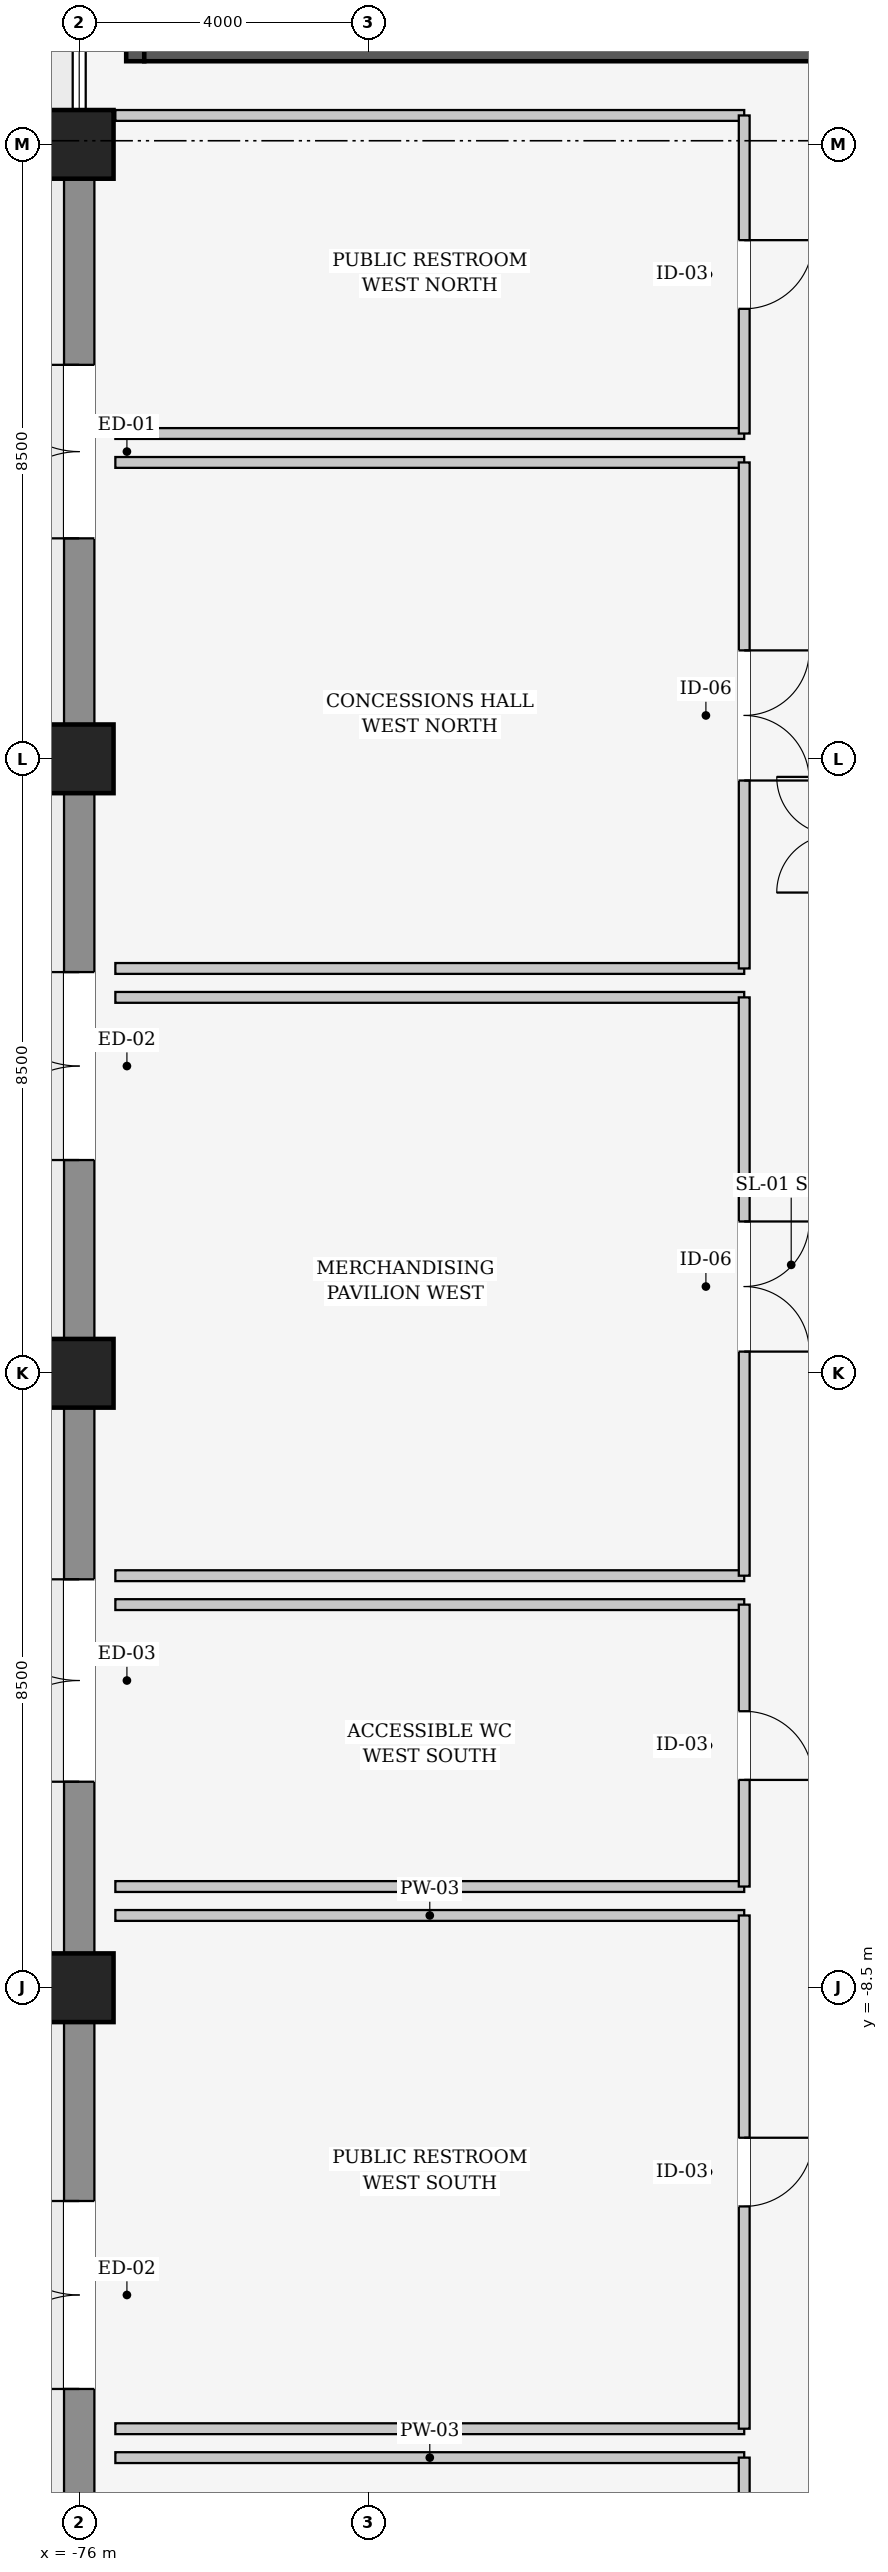
"""IFC4 building model, lengths in metres.
Left out: names, types, materials, properties, quantities, classifications, styles, units other than length and angle.
Written with IfcOpenShell. Run it as: python <this file> out.ifc"""

import sys

from ifc_helpers import new_model, si_unit, direction, frame, frame_2d, origin, origin_2d, place, context, subcontext, project, spatial, rectangle, extrude, element, fill, save


model = new_model("IFC4")
c1 = context("Model", 3, precision=1e-05, world=origin(), true_north=direction((0.0, 1.0)))
c2 = subcontext(c1, "Body", "Model", "MODEL_VIEW")
j1 = project(units=[si_unit("LENGTHUNIT", "METRE"), si_unit("PLANEANGLEUNIT", "RADIAN")], contexts=[c1])
p1 = place(None, origin())
s1 = spatial("IfcSite", under=j1, at=p1, CompositionType="ELEMENT")
p2 = place(p1, origin())
s2 = spatial("IfcBuilding", under=s1, at=p2, CompositionType="ELEMENT")
p3 = place(p2, origin())
s3 = spatial("IfcBuildingStorey", under=s2, at=p3, CompositionType="ELEMENT", Elevation=0.0)
for number, where, z_axis, x_axis in (
    (1, (-76.0, -8.5, 0.0), (0.0, 0.0, 1.0), (1.0, 0.0, 0.0)),
    (2, (-76.0, 0.0, 0.0), (0.0, 0.0, 1.0), (1.0, 0.0, 0.0)),
    (3, (-76.0, 8.5, 0.0), (0.0, 0.0, 1.0), (1.0, 0.0, 0.0)),
    (4, (-76.0, 17.0, 0.0), (0.0, 0.0, 1.0), (1.0, 0.0, 0.0)),
):
    element("IfcColumn", number, at=place(p3, frame(where, z_axis=z_axis, x_axis=x_axis)), inside=s3, PredefinedType="COLUMN", context=c2, shape_type="SweptSolid", body=[
        extrude(rectangle(XDim=0.95, YDim=0.95, at=origin_2d()), origin(), (0.0, 0.0, 1.0), 6.0),
    ])
p4 = place(p3, frame((-76.0, -16.543, 0.0), z_axis=(0.0, 0.0, 1.0), x_axis=(0.0, 1.0, 0.0)))
e5 = element("IfcWall", 5, at=p4, inside=s3, PredefinedType="SOLIDWALL", context=c2, shape_type="SweptSolid", body=[
    extrude(rectangle(XDim=7.586, YDim=0.42, at=frame_2d((3.793, 0.0))), origin(), (0.0, 0.0, 1.0), 4.74),
])
p5 = place(p4, frame((2.493, 0.0, 0.0)))
e6 = element("IfcOpeningElement", 6, at=p5, cuts=e5, PredefinedType="OPENING", context=c2, shape_type="SweptSolid", body=[
    extrude(rectangle(XDim=2.6, YDim=3.0, at=frame_2d((1.3, 1.5))), frame((0.0, 0.22, 0.0), z_axis=(0.0, -1.0, 0.0), x_axis=(1.0, 0.0, 0.0)), (0.0, 0.0, 1.0), 0.44),
])
p6 = place(p3, frame((-76.0, -8.043, 0.0), z_axis=(0.0, 0.0, 1.0), x_axis=(0.0, 1.0, 0.0)))
e7 = element("IfcWall", 7, at=p6, inside=s3, PredefinedType="SOLIDWALL", context=c2, shape_type="SweptSolid", body=[
    extrude(rectangle(XDim=7.586, YDim=0.42, at=frame_2d((3.793, 0.0))), origin(), (0.0, 0.0, 1.0), 4.74),
])
p7 = place(p6, frame((2.393, 0.0, 0.0)))
e8 = element("IfcOpeningElement", 8, at=p7, cuts=e7, PredefinedType="OPENING", context=c2, shape_type="SweptSolid", body=[
    extrude(rectangle(XDim=2.8, YDim=3.2, at=frame_2d((1.4, 1.6))), frame((0.0, 0.22, 0.0), z_axis=(0.0, -1.0, 0.0), x_axis=(1.0, 0.0, 0.0)), (0.0, 0.0, 1.0), 0.44),
])
p8 = place(p3, frame((-76.0, 0.457, 0.0), z_axis=(0.0, 0.0, 1.0), x_axis=(0.0, 1.0, 0.0)))
e9 = element("IfcWall", 9, at=p8, inside=s3, PredefinedType="SOLIDWALL", context=c2, shape_type="SweptSolid", body=[
    extrude(rectangle(XDim=7.586, YDim=0.42, at=frame_2d((3.793, 0.0))), origin(), (0.0, 0.0, 1.0), 4.74),
])
p9 = place(p8, frame((2.493, 0.0, 0.0)))
e10 = element("IfcOpeningElement", 10, at=p9, cuts=e9, PredefinedType="OPENING", context=c2, shape_type="SweptSolid", body=[
    extrude(rectangle(XDim=2.6, YDim=3.0, at=frame_2d((1.3, 1.5))), frame((0.0, 0.22, 0.0), z_axis=(0.0, -1.0, 0.0), x_axis=(1.0, 0.0, 0.0)), (0.0, 0.0, 1.0), 0.44),
])
p10 = place(p3, frame((-76.0, 8.957, 0.0), z_axis=(0.0, 0.0, 1.0), x_axis=(0.0, 1.0, 0.0)))
e11 = element("IfcWall", 11, at=p10, inside=s3, PredefinedType="SOLIDWALL", context=c2, shape_type="SweptSolid", body=[
    extrude(rectangle(XDim=7.586, YDim=0.42, at=frame_2d((3.793, 0.0))), origin(), (0.0, 0.0, 1.0), 4.74),
])
p11 = place(p10, frame((2.593, 0.0, 0.0)))
e12 = element("IfcOpeningElement", 12, at=p11, cuts=e11, PredefinedType="OPENING", context=c2, shape_type="SweptSolid", body=[
    extrude(rectangle(XDim=2.4, YDim=3.0, at=frame_2d((1.2, 1.5))), frame((0.0, 0.22, 0.0), z_axis=(0.0, -1.0, 0.0), x_axis=(1.0, 0.0, 0.0)), (0.0, 0.0, 1.0), 0.44),
])
p12 = place(p3, frame((-75.225, 18.15, 0.0), z_axis=(0.0, 0.0, 1.0), x_axis=(0.0, 1.0, 0.0)))
e13 = element("IfcWall", 13, at=p12, inside=s3, PredefinedType="SHEAR", context=c2, shape_type="SweptSolid", body=[
    extrude(rectangle(XDim=5.7, YDim=0.25, at=frame_2d((2.85, 0.0))), origin(), (0.0, 0.0, 1.0), 6.0),
])
p13 = place(p3, frame((-64.9, 18.275, 0.0), z_axis=(0.0, 0.0, 1.0), x_axis=(-1.0, 0.0, 0.0)))
e14 = element("IfcWall", 14, at=p13, inside=s3, PredefinedType="SHEAR", context=c2, shape_type="SweptSolid", body=[
    extrude(rectangle(XDim=10.2, YDim=0.25, at=frame_2d((5.1, 0.0))), origin(), (0.0, 0.0, 1.0), 6.0),
])
p14 = place(p3, frame((-75.5, -15.0, 0.0), z_axis=(0.0, 0.0, 1.0), x_axis=(1.0, 0.0, 0.0)))
e15 = element("IfcWall", 15, at=p14, inside=s3, PredefinedType="PARTITIONING", context=c2, shape_type="SweptSolid", body=[
    extrude(rectangle(XDim=8.7, YDim=0.15, at=frame_2d((4.35, 0.0))), origin(), (0.0, 0.0, 1.0), 5.64),
])
p15 = place(p3, frame((-66.8, -15.0, 0.0), z_axis=(0.0, 0.0, 1.0), x_axis=(0.0, -1.0, 0.0)))
e16 = element("IfcWall", 16, at=p15, inside=s3, PredefinedType="PARTITIONING", context=c2, shape_type="SweptSolid", body=[
    extrude(rectangle(XDim=9.4, YDim=0.15, at=frame_2d((4.7, 0.0))), origin(), (0.0, 0.0, 1.0), 4.725),
])
p16 = place(p15, frame((3.8, 0.0, 0.0)))
e17 = element("IfcOpeningElement", 17, at=p16, cuts=e16, PredefinedType="OPENING", context=c2, shape_type="SweptSolid", body=[
    extrude(rectangle(XDim=1.8, YDim=2.2, at=frame_2d((0.9, 1.1))), frame((0.0, 0.085, 0.0), z_axis=(0.0, -1.0, 0.0), x_axis=(1.0, 0.0, 0.0)), (0.0, 0.0, 1.0), 0.17),
])
for number, where, z_axis, x_axis in (
    (18, (-75.5, -7.5, 0.0), (0.0, 0.0, 1.0), (1.0, 0.0, 0.0)),
    (19, (-66.8, -14.6, 0.0), (0.0, 0.0, 1.0), (-1.0, 0.0, 0.0)),
):
    element("IfcWall", number, at=place(p3, frame(where, z_axis=z_axis, x_axis=x_axis)), inside=s3, PredefinedType="PARTITIONING", context=c2, shape_type="SweptSolid", body=[
        extrude(rectangle(XDim=8.7, YDim=0.15, at=frame_2d((4.35, 0.0))), origin(), (0.0, 0.0, 1.0), 5.64),
    ])
p17 = place(p3, frame((-66.8, -7.5, 0.0), z_axis=(0.0, 0.0, 1.0), x_axis=(0.0, -1.0, 0.0)))
e20 = element("IfcWall", 20, at=p17, inside=s3, PredefinedType="PARTITIONING", context=c2, shape_type="SweptSolid", body=[
    extrude(rectangle(XDim=7.1, YDim=0.15, at=frame_2d((3.55, 0.0))), origin(), (0.0, 0.0, 1.0), 4.725),
])
p18 = place(p17, frame((3.075, 0.0, 0.0)))
e21 = element("IfcOpeningElement", 21, at=p18, cuts=e20, PredefinedType="OPENING", context=c2, shape_type="SweptSolid", body=[
    extrude(rectangle(XDim=0.95, YDim=2.15, at=frame_2d((0.475, 1.075))), frame((0.0, 0.085, 0.0), z_axis=(0.0, -1.0, 0.0), x_axis=(1.0, 0.0, 0.0)), (0.0, 0.0, 1.0), 0.17),
])
for number, where, z_axis, x_axis in (
    (22, (-75.5, -3.2, 0.0), (0.0, 0.0, 1.0), (1.0, 0.0, 0.0)),
    (23, (-66.8, -7.1, 0.0), (0.0, 0.0, 1.0), (-1.0, 0.0, 0.0)),
):
    element("IfcWall", number, at=place(p3, frame(where, z_axis=z_axis, x_axis=x_axis)), inside=s3, PredefinedType="PARTITIONING", context=c2, shape_type="SweptSolid", body=[
        extrude(rectangle(XDim=8.7, YDim=0.15, at=frame_2d((4.35, 0.0))), origin(), (0.0, 0.0, 1.0), 5.64),
    ])
p19 = place(p3, frame((-66.8, -3.2, 0.0), z_axis=(0.0, 0.0, 1.0), x_axis=(0.0, -1.0, 0.0)))
e24 = element("IfcWall", 24, at=p19, inside=s3, PredefinedType="PARTITIONING", context=c2, shape_type="SweptSolid", body=[
    extrude(rectangle(XDim=3.9, YDim=0.15, at=frame_2d((1.95, 0.0))), origin(), (0.0, 0.0, 1.0), 5.32),
])
p20 = place(p19, frame((1.475, 0.0, 0.0)))
e25 = element("IfcOpeningElement", 25, at=p20, cuts=e24, PredefinedType="OPENING", context=c2, shape_type="SweptSolid", body=[
    extrude(rectangle(XDim=0.95, YDim=2.15, at=frame_2d((0.475, 1.075))), frame((0.0, 0.085, 0.0), z_axis=(0.0, -1.0, 0.0), x_axis=(1.0, 0.0, 0.0)), (0.0, 0.0, 1.0), 0.17),
])
for number, where, z_axis, x_axis in (
    (26, (-75.5, 5.2, 0.0), (0.0, 0.0, 1.0), (1.0, 0.0, 0.0)),
    (27, (-66.8, -2.8, 0.0), (0.0, 0.0, 1.0), (-1.0, 0.0, 0.0)),
):
    element("IfcWall", number, at=place(p3, frame(where, z_axis=z_axis, x_axis=x_axis)), inside=s3, PredefinedType="PARTITIONING", context=c2, shape_type="SweptSolid", body=[
        extrude(rectangle(XDim=8.7, YDim=0.15, at=frame_2d((4.35, 0.0))), origin(), (0.0, 0.0, 1.0), 5.64),
    ])
p21 = place(p3, frame((-66.8, 5.2, 0.0), z_axis=(0.0, 0.0, 1.0), x_axis=(0.0, -1.0, 0.0)))
e28 = element("IfcWall", 28, at=p21, inside=s3, PredefinedType="PARTITIONING", context=c2, shape_type="SweptSolid", body=[
    extrude(rectangle(XDim=8.0, YDim=0.15, at=frame_2d((4.0, 0.0))), origin(), (0.0, 0.0, 1.0), 4.725),
])
p22 = place(p21, frame((3.1, 0.0, 0.0)))
e29 = element("IfcOpeningElement", 29, at=p22, cuts=e28, PredefinedType="OPENING", context=c2, shape_type="SweptSolid", body=[
    extrude(rectangle(XDim=1.8, YDim=2.2, at=frame_2d((0.9, 1.1))), frame((0.0, 0.085, 0.0), z_axis=(0.0, -1.0, 0.0), x_axis=(1.0, 0.0, 0.0)), (0.0, 0.0, 1.0), 0.17),
])
p23 = place(p3, frame((-75.5, 12.6, 0.0), z_axis=(0.0, 0.0, 1.0), x_axis=(1.0, 0.0, 0.0)))
e30 = element("IfcWall", 30, at=p23, inside=s3, PredefinedType="PARTITIONING", context=c2, shape_type="SweptSolid", body=[
    extrude(rectangle(XDim=8.7, YDim=0.15, at=frame_2d((4.35, 0.0))), origin(), (0.0, 0.0, 1.0), 5.32),
])
p24 = place(p3, frame((-66.8, 5.6, 0.0), z_axis=(0.0, 0.0, 1.0), x_axis=(-1.0, 0.0, 0.0)))
e31 = element("IfcWall", 31, at=p24, inside=s3, PredefinedType="PARTITIONING", context=c2, shape_type="SweptSolid", body=[
    extrude(rectangle(XDim=8.7, YDim=0.15, at=frame_2d((4.35, 0.0))), origin(), (0.0, 0.0, 1.0), 5.64),
])
p25 = place(p3, frame((-66.8, 12.6, 0.0), z_axis=(0.0, 0.0, 1.0), x_axis=(0.0, -1.0, 0.0)))
e32 = element("IfcWall", 32, at=p25, inside=s3, PredefinedType="PARTITIONING", context=c2, shape_type="SweptSolid", body=[
    extrude(rectangle(XDim=7.0, YDim=0.15, at=frame_2d((3.5, 0.0))), origin(), (0.0, 0.0, 1.0), 4.725),
])
p26 = place(p25, frame((2.6, 0.0, 0.0)))
e33 = element("IfcOpeningElement", 33, at=p26, cuts=e32, PredefinedType="OPENING", context=c2, shape_type="SweptSolid", body=[
    extrude(rectangle(XDim=1.8, YDim=2.2, at=frame_2d((0.9, 1.1))), frame((0.0, 0.085, 0.0), z_axis=(0.0, -1.0, 0.0), x_axis=(1.0, 0.0, 0.0)), (0.0, 0.0, 1.0), 0.17),
])
p27 = place(p3, frame((-75.5, 17.4, 0.0), z_axis=(0.0, 0.0, 1.0), x_axis=(1.0, 0.0, 0.0)))
e34 = element("IfcWall", 34, at=p27, inside=s3, PredefinedType="PARTITIONING", context=c2, shape_type="SweptSolid", body=[
    extrude(rectangle(XDim=8.7, YDim=0.15, at=frame_2d((4.35, 0.0))), origin(), (0.0, 0.0, 1.0), 4.725),
])
p28 = place(p3, frame((-66.8, 13.0, 0.0), z_axis=(0.0, 0.0, 1.0), x_axis=(-1.0, 0.0, 0.0)))
e35 = element("IfcWall", 35, at=p28, inside=s3, PredefinedType="PARTITIONING", context=c2, shape_type="SweptSolid", body=[
    extrude(rectangle(XDim=8.7, YDim=0.15, at=frame_2d((4.35, 0.0))), origin(), (0.0, 0.0, 1.0), 5.32),
])
p29 = place(p3, frame((-66.8, 17.4, 0.0), z_axis=(0.0, 0.0, 1.0), x_axis=(0.0, -1.0, 0.0)))
e36 = element("IfcWall", 36, at=p29, inside=s3, PredefinedType="PARTITIONING", context=c2, shape_type="SweptSolid", body=[
    extrude(rectangle(XDim=4.4, YDim=0.15, at=frame_2d((2.2, 0.0))), origin(), (0.0, 0.0, 1.0), 4.725),
])
p30 = place(p29, frame((1.725, 0.0, 0.0)))
e37 = element("IfcOpeningElement", 37, at=p30, cuts=e36, PredefinedType="OPENING", context=c2, shape_type="SweptSolid", body=[
    extrude(rectangle(XDim=0.95, YDim=2.15, at=frame_2d((0.475, 1.075))), frame((0.0, 0.085, 0.0), z_axis=(0.0, -1.0, 0.0), x_axis=(1.0, 0.0, 0.0)), (0.0, 0.0, 1.0), 0.17),
])
p31 = place(p5, origin())
e38 = element("IfcDoor", 38, at=p31, inside=s3, OperationType="DOUBLE_DOOR_SINGLE_SWING", PredefinedType="DOOR", context=c2, shape_type="SweptSolid", body=[
    extrude(rectangle(XDim=2.6, YDim=3.0, at=frame_2d((1.3, 1.5))), frame((0.0, 0.025, 0.0), z_axis=(0.0, -1.0, 0.0), x_axis=(1.0, 0.0, 0.0)), (0.0, 0.0, 1.0), 0.05),
])
fill(e6, e38)
p32 = place(p7, origin())
e39 = element("IfcDoor", 39, at=p32, inside=s3, OperationType="DOUBLE_DOOR_SINGLE_SWING", PredefinedType="DOOR", context=c2, shape_type="SweptSolid", body=[
    extrude(rectangle(XDim=2.8, YDim=3.2, at=frame_2d((1.4, 1.6))), frame((0.0, 0.025, 0.0), z_axis=(0.0, -1.0, 0.0), x_axis=(1.0, 0.0, 0.0)), (0.0, 0.0, 1.0), 0.05),
])
fill(e8, e39)
p33 = place(p9, origin())
e40 = element("IfcDoor", 40, at=p33, inside=s3, OperationType="DOUBLE_DOOR_SINGLE_SWING", PredefinedType="DOOR", context=c2, shape_type="SweptSolid", body=[
    extrude(rectangle(XDim=2.6, YDim=3.0, at=frame_2d((1.3, 1.5))), frame((0.0, 0.025, 0.0), z_axis=(0.0, -1.0, 0.0), x_axis=(1.0, 0.0, 0.0)), (0.0, 0.0, 1.0), 0.05),
])
fill(e10, e40)
p34 = place(p11, origin())
e41 = element("IfcDoor", 41, at=p34, inside=s3, OperationType="DOUBLE_DOOR_SINGLE_SWING", PredefinedType="DOOR", context=c2, shape_type="SweptSolid", body=[
    extrude(rectangle(XDim=2.4, YDim=3.0, at=frame_2d((1.2, 1.5))), frame((0.0, 0.025, 0.0), z_axis=(0.0, -1.0, 0.0), x_axis=(1.0, 0.0, 0.0)), (0.0, 0.0, 1.0), 0.05),
])
fill(e12, e41)
p35 = place(p18, origin())
e42 = element("IfcDoor", 42, at=p35, inside=s3, OperationType="SINGLE_SWING_LEFT", PredefinedType="DOOR", context=c2, shape_type="SweptSolid", body=[
    extrude(rectangle(XDim=0.95, YDim=2.15, at=frame_2d((0.475, 1.075))), frame((0.0, 0.025, 0.0), z_axis=(0.0, -1.0, 0.0), x_axis=(1.0, 0.0, 0.0)), (0.0, 0.0, 1.0), 0.05),
])
fill(e21, e42)
p36 = place(p20, origin())
e43 = element("IfcDoor", 43, at=p36, inside=s3, OperationType="SINGLE_SWING_RIGHT", PredefinedType="DOOR", context=c2, shape_type="SweptSolid", body=[
    extrude(rectangle(XDim=0.95, YDim=2.15, at=frame_2d((0.475, 1.075))), frame((0.0, 0.025, 0.0), z_axis=(0.0, -1.0, 0.0), x_axis=(1.0, 0.0, 0.0)), (0.0, 0.0, 1.0), 0.05),
])
fill(e25, e43)
p37 = place(p22, origin())
e44 = element("IfcDoor", 44, at=p37, inside=s3, OperationType="DOUBLE_DOOR_SINGLE_SWING", PredefinedType="DOOR", context=c2, shape_type="SweptSolid", body=[
    extrude(rectangle(XDim=1.8, YDim=2.2, at=frame_2d((0.9, 1.1))), frame((0.0, 0.025, 0.0), z_axis=(0.0, -1.0, 0.0), x_axis=(1.0, 0.0, 0.0)), (0.0, 0.0, 1.0), 0.05),
])
fill(e29, e44)
p38 = place(p26, origin())
e45 = element("IfcDoor", 45, at=p38, inside=s3, OperationType="DOUBLE_DOOR_SINGLE_SWING", PredefinedType="DOOR", context=c2, shape_type="SweptSolid", body=[
    extrude(rectangle(XDim=1.8, YDim=2.2, at=frame_2d((0.9, 1.1))), frame((0.0, 0.025, 0.0), z_axis=(0.0, -1.0, 0.0), x_axis=(1.0, 0.0, 0.0)), (0.0, 0.0, 1.0), 0.05),
])
fill(e33, e45)
p39 = place(p30, origin())
e46 = element("IfcDoor", 46, at=p39, inside=s3, OperationType="SINGLE_SWING_LEFT", PredefinedType="DOOR", context=c2, shape_type="SweptSolid", body=[
    extrude(rectangle(XDim=0.95, YDim=2.15, at=frame_2d((0.475, 1.075))), frame((0.0, 0.025, 0.0), z_axis=(0.0, -1.0, 0.0), x_axis=(1.0, 0.0, 0.0)), (0.0, 0.0, 1.0), 0.05),
])
fill(e37, e46)
save(model, sys.argv[1])
